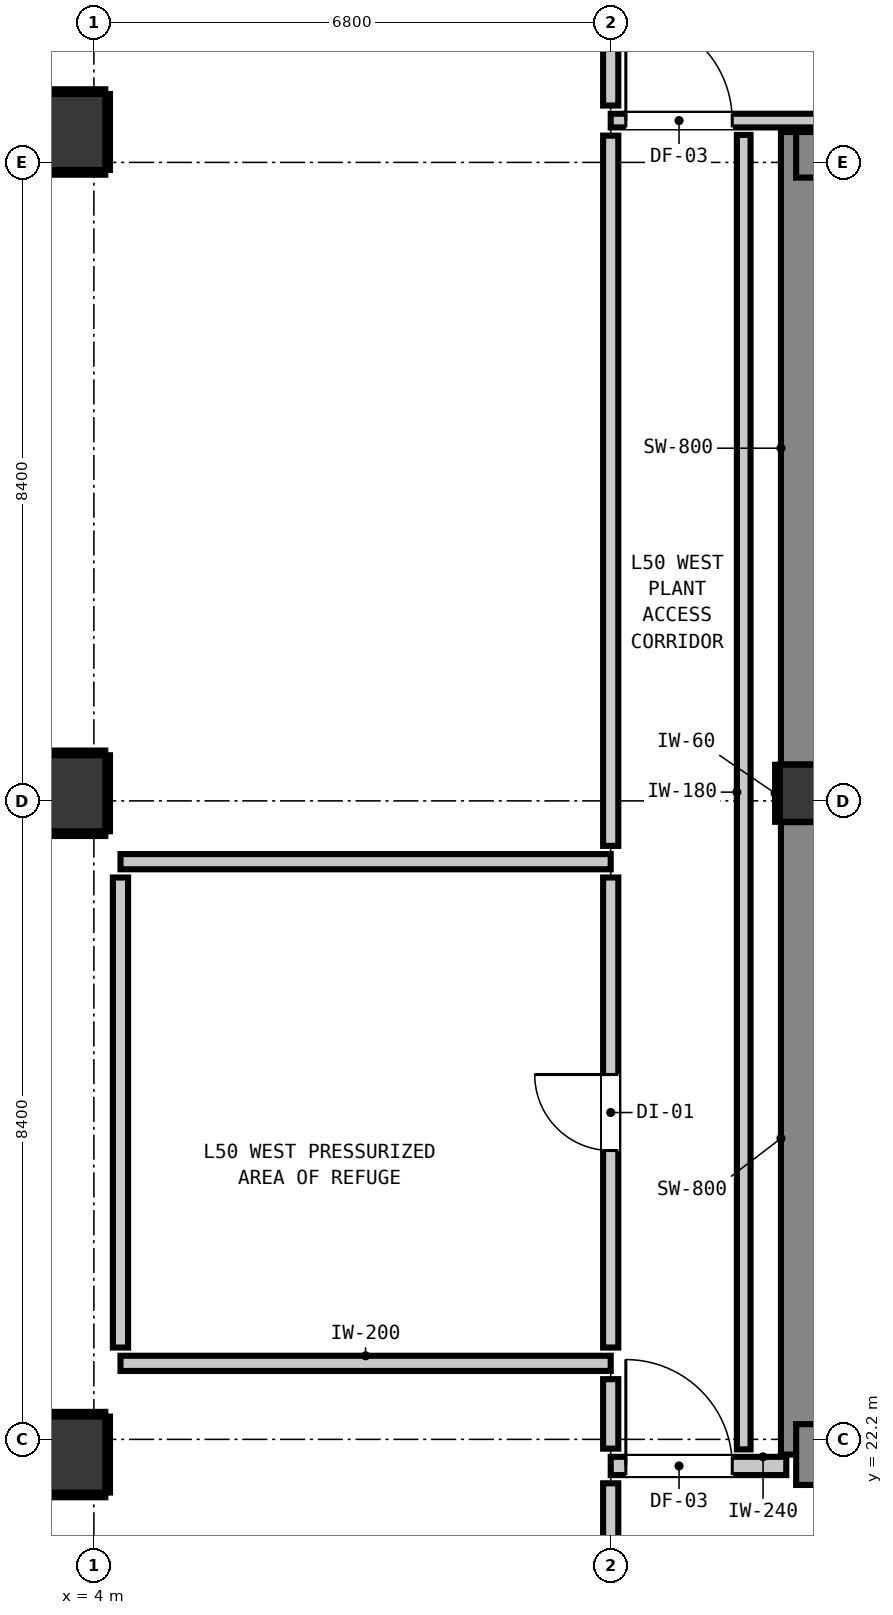
"""IFC4 building model, lengths in metres.
Left out: names, types, materials, properties, quantities, classifications, styles, units other than length and angle.
Written with IfcOpenShell. Run it as: python <this file> out.ifc"""

import sys

from ifc_helpers import new_model, si_unit, direction, frame, frame_2d, origin, origin_2d, place, context, subcontext, project, spatial, rectangle, extrude, element, fill, save


model = new_model("IFC4")
c1 = context("Model", 3, precision=1e-05, world=origin(), true_north=direction((0.0, 1.0)))
c2 = subcontext(c1, "Body", "Model", "MODEL_VIEW")
j1 = project(units=[si_unit("LENGTHUNIT", "METRE"), si_unit("PLANEANGLEUNIT", "RADIAN")], contexts=[c1])
p1 = place(None, origin())
s1 = spatial("IfcSite", under=j1, at=p1, CompositionType="ELEMENT")
p2 = place(p1, origin())
s2 = spatial("IfcBuilding", under=s1, at=p2, CompositionType="ELEMENT")
p3 = place(p2, frame((0.0, 0.0, 172.48)))
s3 = spatial("IfcBuildingStorey", under=s2, at=p3, CompositionType="ELEMENT", Elevation=172.48)
p4 = place(p3, frame((13.4, 30.7, 0.0), z_axis=(0.0, 0.0, 1.0), x_axis=(1.0, 0.0, 0.0)))
e1 = element("IfcColumn", 1, at=p4, inside=s3, PredefinedType="COLUMN", context=c2, shape_type="SweptSolid", body=[
    extrude(rectangle(XDim=0.75, YDim=0.75, at=origin_2d()), origin(), (0.0, 0.0, 1.0), 4.4),
])
p5 = place(p3, frame((13.44, 22.0, 0.0), z_axis=(0.0, 0.0, 1.0), x_axis=(0.0, 1.0, 0.0)))
e2 = element("IfcWall", 2, at=p5, inside=s3, PredefinedType="SHEAR", context=c2, shape_type="SweptSolid", body=[
    extrude(rectangle(XDim=8.32, YDim=0.8, at=frame_2d((4.16, 0.0))), origin(), (0.0, 0.0, 1.0), 4.4),
])
p6 = place(p3, frame((13.44, 31.08, 0.0), z_axis=(0.0, 0.0, 1.0), x_axis=(0.0, 1.0, 0.0)))
e3 = element("IfcWall", 3, at=p6, inside=s3, PredefinedType="SHEAR", context=c2, shape_type="SweptSolid", body=[
    extrude(rectangle(XDim=8.32, YDim=0.8, at=frame_2d((4.16, 0.0))), origin(), (0.0, 0.0, 1.0), 4.4),
])
p7 = place(p3, frame((13.24, 22.0, 0.0), z_axis=(0.0, 0.0, 1.0), x_axis=(1.0, 0.0, 0.0)))
e4 = element("IfcWall", 4, at=p7, inside=s3, PredefinedType="SHEAR", context=c2, shape_type="SweptSolid", body=[
    extrude(rectangle(XDim=4.08, YDim=0.8, at=frame_2d((2.04, 0.0))), origin(), (0.0, 0.0, 1.0), 4.4),
])
p8 = place(p3, frame((13.24, 39.1, 0.0), z_axis=(0.0, 0.0, 1.0), x_axis=(1.0, 0.0, 0.0)))
e5 = element("IfcWall", 5, at=p8, inside=s3, PredefinedType="SHEAR", context=c2, shape_type="SweptSolid", body=[
    extrude(rectangle(XDim=4.08, YDim=0.6, at=frame_2d((2.04, 0.0))), origin(), (0.0, 0.0, 1.0), 4.4),
])
for number, where, z_axis, x_axis in (
    (6, (3.65, 22.0, 0.0), (0.0, 0.0, 1.0), (1.0, 0.0, 0.0)),
    (7, (3.65, 30.7, 0.0), (0.0, 0.0, 1.0), (1.0, 0.0, 0.0)),
    (8, (3.65, 39.4, 0.0), (0.0, 0.0, 1.0), (1.0, 0.0, 0.0)),
):
    element("IfcColumn", number, at=place(p3, frame(where, z_axis=z_axis, x_axis=x_axis)), inside=s3, PredefinedType="COLUMN", context=c2, shape_type="SweptSolid", body=[
        extrude(rectangle(XDim=1.0, YDim=1.0, at=origin_2d()), origin(), (0.0, 0.0, 1.0), 4.4),
    ])
p9 = place(p3, frame((10.8, 21.85, 0.0), z_axis=(0.0, 0.0, 1.0), x_axis=(1.0, 0.0, 0.0)))
e9 = element("IfcWall", 9, at=p9, inside=s3, PredefinedType="PARTITIONING", context=c2, shape_type="SweptSolid", body=[
    extrude(rectangle(XDim=2.31, YDim=0.24, at=frame_2d((1.155, 0.0))), origin(), (0.0, 0.0, 1.0), 3.842),
])
p10 = place(p9, frame((0.199, 0.0, 0.0)))
e10 = element("IfcOpeningElement", 10, at=p10, cuts=e9, PredefinedType="OPENING", context=c2, shape_type="SweptSolid", body=[
    extrude(rectangle(XDim=1.4, YDim=2.15, at=frame_2d((0.7, 1.075))), frame((0.0, 0.13, 0.0), z_axis=(0.0, -1.0, 0.0), x_axis=(1.0, 0.0, 0.0)), (0.0, 0.0, 1.0), 0.26),
])
for number, where, z_axis, x_axis in (
    (11, (4.35, 23.2, 0.0), (0.0, 0.0, 1.0), (1.0, 0.0, 0.0)),
    (12, (4.35, 29.8, 0.0), (0.0, 0.0, 1.0), (1.0, 0.0, 0.0)),
):
    element("IfcWall", number, at=place(p3, frame(where, z_axis=z_axis, x_axis=x_axis)), inside=s3, PredefinedType="PARTITIONING", context=c2, shape_type="SweptSolid", body=[
        extrude(rectangle(XDim=6.45, YDim=0.2, at=frame_2d((3.225, 0.0))), origin(), (0.0, 0.0, 1.0), 4.16),
    ])
p11 = place(p3, frame((10.8, 39.55, 0.0), z_axis=(0.0, 0.0, 1.0), x_axis=(1.0, 0.0, 0.0)))
e13 = element("IfcWall", 13, at=p11, inside=s3, PredefinedType="PARTITIONING", context=c2, shape_type="SweptSolid", body=[
    extrude(rectangle(XDim=9.523, YDim=0.18, at=frame_2d((4.761, 0.0))), origin(), (0.0, 0.0, 1.0), 3.842),
])
p12 = place(p11, frame((6.635, 0.0, 0.0)))
e14 = element("IfcOpeningElement", 14, at=p12, cuts=e13, PredefinedType="OPENING", context=c2, shape_type="SweptSolid", body=[
    extrude(rectangle(XDim=1.4, YDim=2.15, at=frame_2d((0.7, 1.075))), frame((0.0, 0.1, 0.0), z_axis=(0.0, -1.0, 0.0), x_axis=(1.0, 0.0, 0.0)), (0.0, 0.0, 1.0), 0.2),
])
p13 = place(p11, frame((0.199, 0.0, 0.0)))
e15 = element("IfcOpeningElement", 15, at=p13, cuts=e13, PredefinedType="OPENING", context=c2, shape_type="SweptSolid", body=[
    extrude(rectangle(XDim=1.4, YDim=2.15, at=frame_2d((0.7, 1.075))), frame((0.0, 0.1, 0.0), z_axis=(0.0, -1.0, 0.0), x_axis=(1.0, 0.0, 0.0)), (0.0, 0.0, 1.0), 0.2),
])
p14 = place(p3, frame((4.35, 23.408, 0.0), z_axis=(0.0, 0.0, 1.0), x_axis=(0.0, 1.0, 0.0)))
e16 = element("IfcWall", 16, at=p14, inside=s3, PredefinedType="PARTITIONING", context=c2, shape_type="SweptSolid", body=[
    extrude(rectangle(XDim=6.184, YDim=0.2, at=frame_2d((3.092, 0.0))), origin(), (0.0, 0.0, 1.0), 4.16),
])
p15 = place(p3, frame((10.8, 20.308, 0.0), z_axis=(0.0, 0.0, 1.0), x_axis=(0.0, 1.0, 0.0)))
e17 = element("IfcWall", 17, at=p15, inside=s3, PredefinedType="PARTITIONING", context=c2, shape_type="SweptSolid", body=[
    extrude(rectangle(XDim=1.314, YDim=0.2, at=frame_2d((0.657, 0.0))), origin(), (0.0, 0.0, 1.0), 4.16),
])
p16 = place(p3, frame((10.8, 22.078, 0.0), z_axis=(0.0, 0.0, 1.0), x_axis=(0.0, 1.0, 0.0)))
e18 = element("IfcWall", 18, at=p16, inside=s3, PredefinedType="PARTITIONING", context=c2, shape_type="SweptSolid", body=[
    extrude(rectangle(XDim=0.914, YDim=0.2, at=frame_2d((0.457, 0.0))), origin(), (0.0, 0.0, 1.0), 4.16),
])
p17 = place(p3, frame((10.8, 23.408, 0.0), z_axis=(0.0, 0.0, 1.0), x_axis=(0.0, 1.0, 0.0)))
e19 = element("IfcWall", 19, at=p17, inside=s3, PredefinedType="PARTITIONING", context=c2, shape_type="SweptSolid", body=[
    extrude(rectangle(XDim=6.184, YDim=0.2, at=frame_2d((3.092, 0.0))), origin(), (0.0, 0.0, 1.0), 4.16),
])
p18 = place(p17, frame((2.592, 0.0, 0.0)))
e20 = element("IfcOpeningElement", 20, at=p18, cuts=e19, PredefinedType="OPENING", context=c2, shape_type="SweptSolid", body=[
    extrude(rectangle(XDim=1.0, YDim=2.15, at=frame_2d((0.5, 1.075))), frame((0.0, 0.11, 0.0), z_axis=(0.0, -1.0, 0.0), x_axis=(1.0, 0.0, 0.0)), (0.0, 0.0, 1.0), 0.22),
])
p19 = place(p3, frame((10.8, 30.008, 0.0), z_axis=(0.0, 0.0, 1.0), x_axis=(0.0, 1.0, 0.0)))
e21 = element("IfcWall", 21, at=p19, inside=s3, PredefinedType="PARTITIONING", context=c2, shape_type="SweptSolid", body=[
    extrude(rectangle(XDim=9.344, YDim=0.2, at=frame_2d((4.672, 0.0))), origin(), (0.0, 0.0, 1.0), 4.16),
])
p20 = place(p3, frame((10.8, 39.748, 0.0), z_axis=(0.0, 0.0, 1.0), x_axis=(0.0, 1.0, 0.0)))
e22 = element("IfcWall", 22, at=p20, inside=s3, PredefinedType="PARTITIONING", context=c2, shape_type="SweptSolid", body=[
    extrude(rectangle(XDim=1.344, YDim=0.2, at=frame_2d((0.672, 0.0))), origin(), (0.0, 0.0, 1.0), 4.16),
])
p21 = place(p3, frame((12.55, 22.068, 0.0), z_axis=(0.0, 0.0, 1.0), x_axis=(0.0, 1.0, 0.0)))
e23 = element("IfcWall", 23, at=p21, inside=s3, PredefinedType="PARTITIONING", context=c2, shape_type="SweptSolid", body=[
    extrude(rectangle(XDim=17.294, YDim=0.18, at=frame_2d((8.647, 0.0))), origin(), (0.0, 0.0, 1.0), 4.16),
])
p22 = place(p3, frame((12.993, 30.325, 0.0), z_axis=(0.0, 0.0, 1.0), x_axis=(0.0, 1.0, 0.0)))
e24 = element("IfcWall", 24, at=p22, inside=s3, PredefinedType="PARTITIONING", context=c2, shape_type="SweptSolid", body=[
    extrude(rectangle(XDim=0.75, YDim=0.06, at=frame_2d((0.375, 0.0))), origin(), (0.0, 0.0, 1.0), 1.45),
])
for number, where, z_axis, x_axis in (
    (25, (3.21, 21.468, 0.0), (0.0, 0.0, 1.0), (1.0, 0.0, 0.0)),
    (26, (3.21, 22.532, 0.0), (0.0, 0.0, 1.0), (1.0, 0.0, 0.0)),
):
    element("IfcWall", number, at=place(p3, frame(where, z_axis=z_axis, x_axis=x_axis)), inside=s3, PredefinedType="PARTITIONING", context=c2, shape_type="SweptSolid", body=[
        extrude(rectangle(XDim=0.94, YDim=0.06, at=frame_2d((0.47, 0.0))), origin(), (0.0, 0.0, 1.0), 1.45),
    ])
p23 = place(p3, frame((4.182, 21.5, 0.0), z_axis=(0.0, 0.0, 1.0), x_axis=(0.0, 1.0, 0.0)))
e27 = element("IfcWall", 27, at=p23, inside=s3, PredefinedType="PARTITIONING", context=c2, shape_type="SweptSolid", body=[
    extrude(rectangle(XDim=1.0, YDim=0.06, at=frame_2d((0.5, 0.0))), origin(), (0.0, 0.0, 1.0), 1.45),
])
for number, where, z_axis, x_axis in (
    (28, (3.21, 30.168, 0.0), (0.0, 0.0, 1.0), (1.0, 0.0, 0.0)),
    (29, (3.21, 31.232, 0.0), (0.0, 0.0, 1.0), (1.0, 0.0, 0.0)),
):
    element("IfcWall", number, at=place(p3, frame(where, z_axis=z_axis, x_axis=x_axis)), inside=s3, PredefinedType="PARTITIONING", context=c2, shape_type="SweptSolid", body=[
        extrude(rectangle(XDim=0.94, YDim=0.06, at=frame_2d((0.47, 0.0))), origin(), (0.0, 0.0, 1.0), 1.45),
    ])
p24 = place(p3, frame((4.182, 30.2, 0.0), z_axis=(0.0, 0.0, 1.0), x_axis=(0.0, 1.0, 0.0)))
e30 = element("IfcWall", 30, at=p24, inside=s3, PredefinedType="PARTITIONING", context=c2, shape_type="SweptSolid", body=[
    extrude(rectangle(XDim=1.0, YDim=0.06, at=frame_2d((0.5, 0.0))), origin(), (0.0, 0.0, 1.0), 1.45),
])
for number, where, z_axis, x_axis in (
    (31, (3.21, 38.868, 0.0), (0.0, 0.0, 1.0), (1.0, 0.0, 0.0)),
    (32, (3.21, 39.932, 0.0), (0.0, 0.0, 1.0), (1.0, 0.0, 0.0)),
):
    element("IfcWall", number, at=place(p3, frame(where, z_axis=z_axis, x_axis=x_axis)), inside=s3, PredefinedType="PARTITIONING", context=c2, shape_type="SweptSolid", body=[
        extrude(rectangle(XDim=0.94, YDim=0.06, at=frame_2d((0.47, 0.0))), origin(), (0.0, 0.0, 1.0), 1.45),
    ])
p25 = place(p3, frame((4.182, 38.9, 0.0), z_axis=(0.0, 0.0, 1.0), x_axis=(0.0, 1.0, 0.0)))
e33 = element("IfcWall", 33, at=p25, inside=s3, PredefinedType="PARTITIONING", context=c2, shape_type="SweptSolid", body=[
    extrude(rectangle(XDim=1.0, YDim=0.06, at=frame_2d((0.5, 0.0))), origin(), (0.0, 0.0, 1.0), 1.45),
])
p26 = place(p10, origin())
e34 = element("IfcDoor", 34, at=p26, inside=s3, OperationType="SINGLE_SWING_LEFT", PredefinedType="DOOR", context=c2, shape_type="SweptSolid", body=[
    extrude(rectangle(XDim=1.4, YDim=2.15, at=frame_2d((0.7, 1.075))), frame((0.0, 0.025, 0.0), z_axis=(0.0, -1.0, 0.0), x_axis=(1.0, 0.0, 0.0)), (0.0, 0.0, 1.0), 0.05),
])
fill(e10, e34)
p27 = place(p13, origin())
e35 = element("IfcDoor", 35, at=p27, inside=s3, OperationType="SINGLE_SWING_LEFT", PredefinedType="DOOR", context=c2, shape_type="SweptSolid", body=[
    extrude(rectangle(XDim=1.4, YDim=2.15, at=frame_2d((0.7, 1.075))), frame((0.0, 0.025, 0.0), z_axis=(0.0, -1.0, 0.0), x_axis=(1.0, 0.0, 0.0)), (0.0, 0.0, 1.0), 0.05),
])
fill(e15, e35)
p28 = place(p18, origin())
e36 = element("IfcDoor", 36, at=p28, inside=s3, OperationType="SINGLE_SWING_RIGHT", PredefinedType="DOOR", context=c2, shape_type="SweptSolid", body=[
    extrude(rectangle(XDim=1.0, YDim=2.15, at=frame_2d((0.5, 1.075))), frame((0.0, 0.025, 0.0), z_axis=(0.0, -1.0, 0.0), x_axis=(1.0, 0.0, 0.0)), (0.0, 0.0, 1.0), 0.05),
])
fill(e20, e36)
save(model, sys.argv[1])
